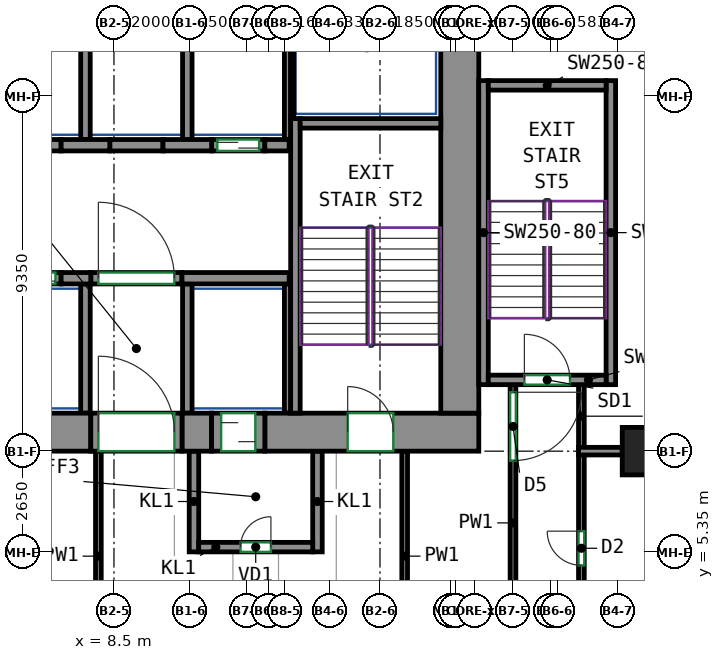
"""IFC4 building model, lengths in metres.
Left out: names, types, materials, properties, quantities, classifications, styles, units other than length and angle.
Written with IfcOpenShell. Run it as: python <this file> out.ifc"""

import sys

from ifc_helpers import new_model, si_unit, direction, frame, frame_2d, origin, origin_2d, place, context, subcontext, project, spatial, rectangle, extrude, source, transform, mapped, element, fill, save


model = new_model("IFC4")
c1 = context("Model", 3, precision=1e-05, world=origin(), true_north=direction((0.0, 1.0)))
c2 = subcontext(c1, "Body", "Model", "MODEL_VIEW")
j1 = project(units=[si_unit("LENGTHUNIT", "METRE"), si_unit("PLANEANGLEUNIT", "RADIAN")], contexts=[c1])
p1 = place(None, origin())
s1 = spatial("IfcSite", under=j1, at=p1, CompositionType="ELEMENT")
p2 = place(p1, origin())
s2 = spatial("IfcBuilding", under=s1, at=p2, CompositionType="ELEMENT")
p3 = place(p2, frame((0.0, 0.0, 91.2)))
s3 = spatial("IfcBuildingStorey", under=s2, at=p3, CompositionType="ELEMENT", Elevation=91.2)
m1 = source(origin(), c2, "Body", "SweptSolid", [
    extrude(rectangle(XDim=1.25, YDim=1.25, at=origin_2d()), origin(), (0.0, 0.0, 1.0), 3.6),
])
p4 = place(p3, frame((22.5, 8.0, 0.0), z_axis=(0.0, 0.0, 1.0), x_axis=(1.0, 0.0, 0.0)))
e1 = element("IfcColumn", 1, at=p4, inside=s3, PredefinedType="COLUMN", context=c2, shape_type="MappedRepresentation", body=[
    mapped(m1, transform((0.0, 0.0, 0.0))),
])
m2 = source(origin(), c2, "Body", "SweptSolid", [
    extrude(rectangle(XDim=14.18, YDim=1.0, at=frame_2d((7.09, 0.0))), origin(), (0.0, 0.0, 1.0), 3.6),
])
p5 = place(p3, frame((-6.29, 8.5, 0.0), z_axis=(0.0, 0.0, 1.0), x_axis=(1.0, 0.0, 0.0)))
e2 = element("IfcWall", 2, at=p5, inside=s3, PredefinedType="SHEAR", context=c2, shape_type="MappedRepresentation", body=[
    mapped(m2, transform((0.0, 0.0, 0.0))),
])
m3 = source(origin(), c2, "Body", "SweptSolid", [
    extrude(rectangle(XDim=0.78, YDim=1.0, at=frame_2d((0.39, 0.0))), origin(), (0.0, 0.0, 1.0), 3.6),
])
p6 = place(p3, frame((10.29, 8.5, 0.0), z_axis=(0.0, 0.0, 1.0), x_axis=(1.0, 0.0, 0.0)))
e3 = element("IfcWall", 3, at=p6, inside=s3, PredefinedType="SHEAR", context=c2, shape_type="MappedRepresentation", body=[
    mapped(m3, transform((0.0, 0.0, 0.0))),
])
m4 = source(origin(), c2, "Body", "SweptSolid", [
    extrude(rectangle(XDim=5.63, YDim=1.0, at=frame_2d((2.815, 0.0))), origin(), (0.0, 0.0, 1.0), 3.6),
])
p7 = place(p3, frame((12.47, 8.5, 0.0), z_axis=(0.0, 0.0, 1.0), x_axis=(1.0, 0.0, 0.0)))
e4 = element("IfcWall", 4, at=p7, inside=s3, PredefinedType="SHEAR", context=c2, shape_type="MappedRepresentation", body=[
    mapped(m4, transform((0.0, 0.0, 0.0))),
])
p8 = place(p7, frame((2.18, 0.0, 0.0)))
e5 = element("IfcOpeningElement", 5, at=p8, cuts=e4, PredefinedType="OPENING", context=c2, shape_type="SweptSolid", body=[
    extrude(rectangle(XDim=1.2, YDim=2.1, at=frame_2d((0.6, 1.05))), frame((0.0, 0.51, 0.0), z_axis=(0.0, -1.0, 0.0), x_axis=(1.0, 0.0, 0.0)), (0.0, 0.0, 1.0), 1.02),
])
m5 = source(origin(), c2, "Body", "SweptSolid", [
    extrude(rectangle(XDim=12.0, YDim=1.0, at=frame_2d((6.0, 0.0))), origin(), (0.0, 0.0, 1.0), 3.6),
])
p9 = place(p3, frame((17.6, 9.0, 0.0), z_axis=(0.0, 0.0, 1.0), x_axis=(0.0, 1.0, 0.0)))
e6 = element("IfcWall", 6, at=p9, inside=s3, PredefinedType="SHEAR", context=c2, shape_type="MappedRepresentation", body=[
    mapped(m5, transform((0.0, 0.0, 0.0))),
])
m6 = source(origin(), c2, "Body", "SweptSolid", [
    extrude(rectangle(XDim=7.75, YDim=0.25, at=frame_2d((3.875, 0.0))), origin(), (0.0, 0.0, 1.0), 3.6),
])
p10 = place(p3, frame((13.275, 9.0, 0.0), z_axis=(0.0, 0.0, 1.0), x_axis=(0.0, 1.0, 0.0)))
e7 = element("IfcWall", 7, at=p10, inside=s3, PredefinedType="SHEAR", context=c2, shape_type="MappedRepresentation", body=[
    mapped(m6, transform((0.0, 0.0, 0.0))),
])
m7 = source(origin(), c2, "Body", "SweptSolid", [
    extrude(rectangle(XDim=3.7, YDim=0.25, at=frame_2d((1.85, 0.0))), origin(), (0.0, 0.0, 1.0), 3.6),
])
p11 = place(p3, frame((13.4, 16.625, 0.0), z_axis=(0.0, 0.0, 1.0), x_axis=(1.0, 0.0, 0.0)))
e8 = element("IfcWall", 8, at=p11, inside=s3, PredefinedType="SHEAR", context=c2, shape_type="MappedRepresentation", body=[
    mapped(m7, transform((0.0, 0.0, 0.0))),
])
m8 = source(origin(), c2, "Body", "SweptSolid", [
    extrude(rectangle(XDim=8.0, YDim=0.25, at=frame_2d((4.0, 0.0))), origin(), (0.0, 0.0, 1.0), 3.6),
])
for number, where, z_axis, x_axis in (
    (9, (18.225, 9.75, 0.0), (0.0, 0.0, 1.0), (0.0, 1.0, 0.0)),
    (10, (21.575, 9.75, 0.0), (0.0, 0.0, 1.0), (0.0, 1.0, 0.0)),
):
    element("IfcWall", number, at=place(p3, frame(where, z_axis=z_axis, x_axis=x_axis)), inside=s3, PredefinedType="SHEAR", context=c2, shape_type="MappedRepresentation", body=[
        mapped(m8, transform((0.0, 0.0, 0.0))),
    ])
m9 = source(origin(), c2, "Body", "SweptSolid", [
    extrude(rectangle(XDim=3.1, YDim=0.25, at=frame_2d((1.55, 0.0))), origin(), (0.0, 0.0, 1.0), 3.6),
])
p12 = place(p3, frame((18.35, 9.875, 0.0), z_axis=(0.0, 0.0, 1.0), x_axis=(1.0, 0.0, 0.0)))
e11 = element("IfcWall", 11, at=p12, inside=s3, PredefinedType="SHEAR", context=c2, shape_type="MappedRepresentation", body=[
    mapped(m9, transform((0.0, 0.0, 0.0))),
])
p13 = place(p12, frame((0.95, 0.0, 0.0)))
e12 = element("IfcOpeningElement", 12, at=p13, cuts=e11, PredefinedType="OPENING", context=c2, shape_type="SweptSolid", body=[
    extrude(rectangle(XDim=1.2, YDim=2.1, at=frame_2d((0.6, 1.05))), frame((0.0, 0.135, 0.0), z_axis=(0.0, -1.0, 0.0), x_axis=(1.0, 0.0, 0.0)), (0.0, 0.0, 1.0), 0.27),
])
p14 = place(p3, frame((18.35, 17.625, 0.0), z_axis=(0.0, 0.0, 1.0), x_axis=(1.0, 0.0, 0.0)))
e13 = element("IfcWall", 13, at=p14, inside=s3, PredefinedType="SHEAR", context=c2, shape_type="MappedRepresentation", body=[
    mapped(m9, transform((0.0, 0.0, 0.0))),
])
m10 = source(origin(), c2, "Body", "SweptSolid", [
    extrude(rectangle(XDim=0.78, YDim=0.3, at=frame_2d((0.39, 0.0))), origin(), (0.0, 0.0, 1.0), 3.6),
])
p15 = place(p3, frame((7.11, 12.55, 0.0), z_axis=(0.0, 0.0, 1.0), x_axis=(1.0, 0.0, 0.0)))
e14 = element("IfcWall", 14, at=p15, inside=s3, PredefinedType="SHEAR", context=c2, shape_type="MappedRepresentation", body=[
    mapped(m10, transform((0.0, 0.0, 0.0))),
])
m11 = source(origin(), c2, "Body", "SweptSolid", [
    extrude(rectangle(XDim=2.82, YDim=0.3, at=frame_2d((1.41, 0.0))), origin(), (0.0, 0.0, 1.0), 3.6),
])
p16 = place(p3, frame((10.29, 12.55, 0.0), z_axis=(0.0, 0.0, 1.0), x_axis=(1.0, 0.0, 0.0)))
e15 = element("IfcWall", 15, at=p16, inside=s3, PredefinedType="SHEAR", context=c2, shape_type="MappedRepresentation", body=[
    mapped(m11, transform((0.0, 0.0, 0.0))),
])
m12 = source(origin(), c2, "Body", "SweptSolid", [
    extrude(rectangle(XDim=1.28, YDim=0.3, at=frame_2d((0.64, 0.0))), origin(), (0.0, 0.0, 1.0), 3.6),
])
p17 = place(p3, frame((7.11, 16.05, 0.0), z_axis=(0.0, 0.0, 1.0), x_axis=(1.0, 0.0, 0.0)))
e16 = element("IfcWall", 16, at=p17, inside=s3, PredefinedType="SHEAR", context=c2, shape_type="MappedRepresentation", body=[
    mapped(m12, transform((0.0, 0.0, 0.0))),
])
m13 = source(origin(), c2, "Body", "SweptSolid", [
    extrude(rectangle(XDim=1.28, YDim=0.3, at=frame_2d((0.64, 0.0))), origin(), (0.0, 0.0, 1.0), 3.6),
])
p18 = place(p3, frame((9.79, 16.05, 0.0), z_axis=(0.0, 0.0, 1.0), x_axis=(1.0, 0.0, 0.0)))
e17 = element("IfcWall", 17, at=p18, inside=s3, PredefinedType="SHEAR", context=c2, shape_type="MappedRepresentation", body=[
    mapped(m13, transform((0.0, 0.0, 0.0))),
])
m14 = source(origin(), c2, "Body", "SweptSolid", [
    extrude(rectangle(XDim=0.64, YDim=0.3, at=frame_2d((0.32, 0.0))), origin(), (0.0, 0.0, 1.0), 3.6),
])
p19 = place(p3, frame((12.47, 16.05, 0.0), z_axis=(0.0, 0.0, 1.0), x_axis=(1.0, 0.0, 0.0)))
e18 = element("IfcWall", 18, at=p19, inside=s3, PredefinedType="SHEAR", context=c2, shape_type="MappedRepresentation", body=[
    mapped(m14, transform((0.0, 0.0, 0.0))),
])
m15 = source(origin(), c2, "Body", "SweptSolid", [
    extrude(rectangle(XDim=1.4, YDim=0.3, at=frame_2d((0.7, 0.0))), origin(), (0.0, 0.0, 1.0), 3.6),
])
p20 = place(p3, frame((5.71, 12.55, 0.0), z_axis=(0.0, 0.0, 1.0), x_axis=(1.0, 0.0, 0.0)))
e19 = element("IfcWall", 19, at=p20, inside=s3, PredefinedType="PARTITIONING", context=c2, shape_type="MappedRepresentation", body=[
    mapped(m15, transform((0.0, 0.0, 0.0))),
])
p21 = place(p20, frame((0.15, 0.0, 0.0)))
e20 = element("IfcOpeningElement", 20, at=p21, cuts=e19, PredefinedType="OPENING", context=c2, shape_type="SweptSolid", body=[
    extrude(rectangle(XDim=1.1, YDim=2.1, at=frame_2d((0.55, 1.05))), frame((0.0, 0.16, 0.0), z_axis=(0.0, -1.0, 0.0), x_axis=(1.0, 0.0, 0.0)), (0.0, 0.0, 1.0), 0.32),
])
m16 = source(origin(), c2, "Body", "SweptSolid", [
    extrude(rectangle(XDim=1.4, YDim=0.3, at=frame_2d((0.7, 0.0))), origin(), (0.0, 0.0, 1.0), 3.6),
])
p22 = place(p3, frame((11.07, 16.05, 0.0), z_axis=(0.0, 0.0, 1.0), x_axis=(1.0, 0.0, 0.0)))
e21 = element("IfcWall", 21, at=p22, inside=s3, PredefinedType="PARTITIONING", context=c2, shape_type="MappedRepresentation", body=[
    mapped(m16, transform((0.0, 0.0, 0.0))),
])
p23 = place(p22, frame((0.15, 0.0, 0.0)))
e22 = element("IfcOpeningElement", 22, at=p23, cuts=e21, PredefinedType="OPENING", context=c2, shape_type="SweptSolid", body=[
    extrude(rectangle(XDim=1.1, YDim=2.1, at=frame_2d((0.55, 1.05))), frame((0.0, 0.16, 0.0), z_axis=(0.0, -1.0, 0.0), x_axis=(1.0, 0.0, 0.0)), (0.0, 0.0, 1.0), 0.32),
])
m17 = source(origin(), c2, "Body", "SweptSolid", [
    extrude(rectangle(XDim=2.4, YDim=0.3, at=frame_2d((1.2, 0.0))), origin(), (0.0, 0.0, 1.0), 3.6),
])
p24 = place(p3, frame((7.89, 12.55, 0.0), z_axis=(0.0, 0.0, 1.0), x_axis=(1.0, 0.0, 0.0)))
e23 = element("IfcWall", 23, at=p24, inside=s3, PredefinedType="PARTITIONING", context=c2, shape_type="MappedRepresentation", body=[
    mapped(m17, transform((0.0, 0.0, 0.0))),
])
p25 = place(p24, frame((0.2, 0.0, 0.0)))
e24 = element("IfcOpeningElement", 24, at=p25, cuts=e23, PredefinedType="OPENING", context=c2, shape_type="SweptSolid", body=[
    extrude(rectangle(XDim=2.0, YDim=2.1, at=frame_2d((1.0, 1.05))), frame((0.0, 0.16, 0.0), z_axis=(0.0, -1.0, 0.0), x_axis=(1.0, 0.0, 0.0)), (0.0, 0.0, 1.0), 0.32),
])
for number, where, z_axis, x_axis in (
    (25, (5.71, 16.05, 0.0), (0.0, 0.0, 1.0), (1.0, 0.0, 0.0)),
    (26, (8.39, 16.05, 0.0), (0.0, 0.0, 1.0), (1.0, 0.0, 0.0)),
):
    element("IfcWall", number, at=place(p3, frame(where, z_axis=z_axis, x_axis=x_axis)), inside=s3, PredefinedType="PARTITIONING", context=c2, shape_type="MappedRepresentation", body=[
        mapped(m15, transform((0.0, 0.0, 0.0))),
    ])
m18 = source(origin(), c2, "Body", "SweptSolid", [
    extrude(rectangle(XDim=2.65, YDim=0.25, at=frame_2d((1.325, 0.0))), origin(), (0.0, 0.0, 1.0), 3.6),
])
for number, where, z_axis, x_axis in (
    (27, (10.605, 5.35, 0.0), (0.0, 0.0, 1.0), (0.0, 1.0, 0.0)),
    (28, (13.855, 5.35, 0.0), (0.0, 0.0, 1.0), (0.0, 1.0, 0.0)),
):
    element("IfcWall", number, at=place(p3, frame(where, z_axis=z_axis, x_axis=x_axis)), inside=s3, PredefinedType="PARTITIONING", context=c2, shape_type="MappedRepresentation", body=[
        mapped(m18, transform((0.0, 0.0, 0.0))),
    ])
m19 = source(origin(), c2, "Body", "SweptSolid", [
    extrude(rectangle(XDim=3.0, YDim=0.25, at=frame_2d((1.5, 0.0))), origin(), (0.0, 0.0, 1.0), 3.6),
])
p26 = place(p3, frame((10.73, 5.475, 0.0), z_axis=(0.0, 0.0, 1.0), x_axis=(1.0, 0.0, 0.0)))
e29 = element("IfcWall", 29, at=p26, inside=s3, PredefinedType="PARTITIONING", context=c2, shape_type="MappedRepresentation", body=[
    mapped(m19, transform((0.0, 0.0, 0.0))),
])
p27 = place(p26, frame((1.1, 0.0, 0.0)))
e30 = element("IfcOpeningElement", 30, at=p27, cuts=e29, PredefinedType="OPENING", context=c2, shape_type="SweptSolid", body=[
    extrude(rectangle(XDim=0.8, YDim=2.0, at=frame_2d((0.4, 1.0))), frame((0.0, 0.135, 0.0), z_axis=(0.0, -1.0, 0.0), x_axis=(1.0, 0.0, 0.0)), (0.0, 0.0, 1.0), 0.27),
])
m20 = source(origin(), c2, "Body", "SweptSolid", [
    extrude(rectangle(XDim=3.275, YDim=0.165, at=frame_2d((1.638, 0.0))), origin(), (0.0, 0.0, 1.0), 3.6),
])
p28 = place(p3, frame((13.067, 16.2, 0.0), z_axis=(0.0, 0.0, 1.0), x_axis=(0.0, 1.0, 0.0)))
e31 = element("IfcWall", 31, at=p28, inside=s3, PredefinedType="PARTITIONING", context=c2, shape_type="MappedRepresentation", body=[
    mapped(m20, transform((0.0, 0.0, 0.0))),
])
m21 = source(origin(), c2, "Body", "SweptSolid", [
    extrude(rectangle(XDim=3.275, YDim=0.25, at=frame_2d((1.638, 0.0))), origin(), (0.0, 0.0, 1.0), 3.6),
])
p29 = place(p3, frame((10.43, 16.2, 0.0), z_axis=(0.0, 0.0, 1.0), x_axis=(0.0, 1.0, 0.0)))
e32 = element("IfcWall", 32, at=p29, inside=s3, PredefinedType="PARTITIONING", context=c2, shape_type="MappedRepresentation", body=[
    mapped(m21, transform((0.0, 0.0, 0.0))),
])
m22 = source(origin(), c2, "Body", "SweptSolid", [
    extrude(rectangle(XDim=2.725, YDim=0.085, at=frame_2d((1.363, 0.0))), origin(), (0.0, 0.0, 1.0), 3.6),
])
p30 = place(p3, frame((13.192, 16.75, 0.0), z_axis=(0.0, 0.0, 1.0), x_axis=(0.0, 1.0, 0.0)))
e33 = element("IfcWall", 33, at=p30, inside=s3, PredefinedType="PARTITIONING", context=c2, shape_type="MappedRepresentation", body=[
    mapped(m22, transform((0.0, 0.0, 0.0))),
])
p31 = place(p3, frame((7.75, 16.2, 0.0), z_axis=(0.0, 0.0, 1.0), x_axis=(0.0, 1.0, 0.0)))
e34 = element("IfcWall", 34, at=p31, inside=s3, PredefinedType="PARTITIONING", context=c2, shape_type="MappedRepresentation", body=[
    mapped(m21, transform((0.0, 0.0, 0.0))),
])
m23 = source(origin(), c2, "Body", "SweptSolid", [
    extrude(rectangle(XDim=3.4, YDim=0.25, at=frame_2d((1.7, 0.0))), origin(), (0.0, 0.0, 1.0), 3.6),
])
p32 = place(p3, frame((10.43, 9.0, 0.0), z_axis=(0.0, 0.0, 1.0), x_axis=(0.0, 1.0, 0.0)))
e35 = element("IfcWall", 35, at=p32, inside=s3, PredefinedType="PARTITIONING", context=c2, shape_type="MappedRepresentation", body=[
    mapped(m23, transform((0.0, 0.0, 0.0))),
])
m24 = source(origin(), c2, "Body", "SweptSolid", [
    extrude(rectangle(XDim=3.4, YDim=0.165, at=frame_2d((1.7, 0.0))), origin(), (0.0, 0.0, 1.0), 3.6),
])
p33 = place(p3, frame((13.067, 9.0, 0.0), z_axis=(0.0, 0.0, 1.0), x_axis=(0.0, 1.0, 0.0)))
e36 = element("IfcWall", 36, at=p33, inside=s3, PredefinedType="PARTITIONING", context=c2, shape_type="MappedRepresentation", body=[
    mapped(m24, transform((0.0, 0.0, 0.0))),
])
p34 = place(p3, frame((7.75, 9.0, 0.0), z_axis=(0.0, 0.0, 1.0), x_axis=(0.0, 1.0, 0.0)))
e37 = element("IfcWall", 37, at=p34, inside=s3, PredefinedType="PARTITIONING", context=c2, shape_type="MappedRepresentation", body=[
    mapped(m23, transform((0.0, 0.0, 0.0))),
])
m25 = source(origin(), c2, "Body", "SweptSolid", [
    extrude(rectangle(XDim=2.4, YDim=1.0, at=frame_2d((1.2, 0.0))), origin(), (0.0, 0.0, 1.0), 2.7),
])
p35 = place(p3, frame((7.89, 8.5, 0.0), z_axis=(0.0, 0.0, 1.0), x_axis=(1.0, 0.0, 0.0)))
e38 = element("IfcWall", 38, at=p35, inside=s3, PredefinedType="PARTITIONING", context=c2, shape_type="MappedRepresentation", body=[
    mapped(m25, transform((0.0, 0.0, 0.0))),
])
p36 = place(p35, frame((0.2, 0.0, 0.0)))
e39 = element("IfcOpeningElement", 39, at=p36, cuts=e38, PredefinedType="OPENING", context=c2, shape_type="SweptSolid", body=[
    extrude(rectangle(XDim=2.0, YDim=2.1, at=frame_2d((1.0, 1.05))), frame((0.0, 0.51, 0.0), z_axis=(0.0, -1.0, 0.0), x_axis=(1.0, 0.0, 0.0)), (0.0, 0.0, 1.0), 1.02),
])
m26 = source(origin(), c2, "Body", "SweptSolid", [
    extrude(rectangle(XDim=1.4, YDim=1.0, at=frame_2d((0.7, 0.0))), origin(), (0.0, 0.0, 1.0), 2.7),
])
p37 = place(p3, frame((11.07, 8.5, 0.0), z_axis=(0.0, 0.0, 1.0), x_axis=(1.0, 0.0, 0.0)))
e40 = element("IfcWall", 40, at=p37, inside=s3, PredefinedType="PARTITIONING", context=c2, shape_type="MappedRepresentation", body=[
    mapped(m26, transform((0.0, 0.0, 0.0))),
])
p38 = place(p37, frame((0.25, 0.0, 0.0)))
e41 = element("IfcOpeningElement", 41, at=p38, cuts=e40, PredefinedType="OPENING", context=c2, shape_type="SweptSolid", body=[
    extrude(rectangle(XDim=0.9, YDim=2.1, at=frame_2d((0.45, 1.05))), frame((0.0, 0.51, 0.0), z_axis=(0.0, -1.0, 0.0), x_axis=(1.0, 0.0, 0.0)), (0.0, 0.0, 1.0), 1.02),
])
for number, where, z_axis, x_axis in (
    (42, (8.09, 8.0, 0.0), (0.0, 0.0, 1.0), (0.0, -1.0, 0.0)),
    (43, (16.15, 2.475, 0.0), (0.0, 0.0, 1.0), (0.0, 1.0, 0.0)),
):
    element("IfcWall", number, at=place(p3, frame(where, z_axis=z_axis, x_axis=x_axis)), inside=s3, PredefinedType="PARTITIONING", context=c2, shape_type="SweptSolid", body=[
        extrude(rectangle(XDim=5.525, YDim=0.15, at=frame_2d((2.762, 0.0))), origin(), (0.0, 0.0, 1.0), 3.6),
    ])
p39 = place(p3, frame((19.0, 9.75, 0.0), z_axis=(0.0, 0.0, 1.0), x_axis=(0.0, -1.0, 0.0)))
e44 = element("IfcWall", 44, at=p39, inside=s3, PredefinedType="PARTITIONING", context=c2, shape_type="SweptSolid", body=[
    extrude(rectangle(XDim=7.275, YDim=0.15, at=frame_2d((3.637, 0.0))), origin(), (0.0, 0.0, 1.0), 3.6),
])
p40 = place(p39, frame((0.2, 0.0, 0.0)))
e45 = element("IfcOpeningElement", 45, at=p40, cuts=e44, PredefinedType="OPENING", context=c2, shape_type="SweptSolid", body=[
    extrude(rectangle(XDim=1.8, YDim=2.1, at=frame_2d((0.9, 1.05))), frame((0.0, 0.085, 0.0), z_axis=(0.0, -1.0, 0.0), x_axis=(1.0, 0.0, 0.0)), (0.0, 0.0, 1.0), 0.17),
])
p41 = place(p3, frame((20.8, 8.09, 0.0), z_axis=(0.0, 0.0, 1.0), x_axis=(0.0, 1.0, 0.0)))
e46 = element("IfcWall", 46, at=p41, inside=s3, PredefinedType="PARTITIONING", context=c2, shape_type="SweptSolid", body=[
    extrude(rectangle(XDim=1.66, YDim=0.15, at=frame_2d((0.83, 0.0))), origin(), (0.0, 0.0, 1.0), 3.6),
])
p42 = place(p3, frame((20.8, 2.475, 0.0), z_axis=(0.0, 0.0, 1.0), x_axis=(0.0, 1.0, 0.0)))
e47 = element("IfcWall", 47, at=p42, inside=s3, PredefinedType="PARTITIONING", context=c2, shape_type="SweptSolid", body=[
    extrude(rectangle(XDim=5.435, YDim=0.15, at=frame_2d((2.717, 0.0))), origin(), (0.0, 0.0, 1.0), 3.6),
])
p43 = place(p42, frame((2.52, 0.0, 0.0)))
e48 = element("IfcOpeningElement", 48, at=p43, cuts=e47, PredefinedType="OPENING", context=c2, shape_type="SweptSolid", body=[
    extrude(rectangle(XDim=0.9, YDim=2.1, at=frame_2d((0.45, 1.05))), frame((0.0, 0.085, 0.0), z_axis=(0.0, -1.0, 0.0), x_axis=(1.0, 0.0, 0.0)), (0.0, 0.0, 1.0), 0.17),
])
p44 = place(p3, frame((20.726, 8.0, 0.0), z_axis=(0.0, 0.0, 1.0), x_axis=(1.0, 0.0, 0.0)))
e49 = element("IfcWall", 49, at=p44, inside=s3, PredefinedType="PARTITIONING", context=c2, shape_type="SweptSolid", body=[
    extrude(rectangle(XDim=1.149, YDim=0.2, at=frame_2d((0.574, 0.0))), origin(), (0.0, 0.0, 1.0), 3.6),
])
p45 = place(p25, origin())
e50 = element("IfcDoor", 50, at=p45, inside=s3, OperationType="DOUBLE_DOOR_SINGLE_SWING", PredefinedType="DOOR", context=c2, shape_type="SweptSolid", body=[
    extrude(rectangle(XDim=2.0, YDim=2.1, at=frame_2d((1.0, 1.05))), frame((0.0, 0.025, 0.0), z_axis=(0.0, -1.0, 0.0), x_axis=(1.0, 0.0, 0.0)), (0.0, 0.0, 1.0), 0.05),
])
fill(e24, e50)
p46 = place(p36, origin())
e51 = element("IfcDoor", 51, at=p46, inside=s3, OperationType="DOUBLE_DOOR_SINGLE_SWING", PredefinedType="DOOR", context=c2, shape_type="SweptSolid", body=[
    extrude(rectangle(XDim=2.0, YDim=2.1, at=frame_2d((1.0, 1.05))), frame((0.0, 0.405, 0.0), z_axis=(0.0, -1.0, 0.0), x_axis=(1.0, 0.0, 0.0)), (0.0, 0.0, 1.0), 0.05),
])
fill(e39, e51)
p47 = place(p27, origin())
e52 = element("IfcDoor", 52, at=p47, inside=s3, OperationType="SINGLE_SWING_RIGHT", PredefinedType="DOOR", context=c2, shape_type="SweptSolid", body=[
    extrude(rectangle(XDim=0.8, YDim=2.0, at=frame_2d((0.4, 1.0))), frame((0.0, 0.025, 0.0), z_axis=(0.0, -1.0, 0.0), x_axis=(1.0, 0.0, 0.0)), (0.0, 0.0, 1.0), 0.05),
])
fill(e30, e52)
p48 = place(p38, origin())
e53 = element("IfcDoor", 53, at=p48, inside=s3, OperationType="SLIDING_TO_LEFT", PredefinedType="DOOR", context=c2, shape_type="SweptSolid", body=[
    extrude(rectangle(XDim=0.9, YDim=2.1, at=frame_2d((0.45, 1.05))), frame((0.0, 0.405, 0.0), z_axis=(0.0, -1.0, 0.0), x_axis=(1.0, 0.0, 0.0)), (0.0, 0.0, 1.0), 0.05),
])
fill(e41, e53)
p49 = place(p21, origin())
e54 = element("IfcDoor", 54, at=p49, inside=s3, OperationType="DOUBLE_DOOR_SLIDING", PredefinedType="DOOR", context=c2, shape_type="SweptSolid", body=[
    extrude(rectangle(XDim=1.1, YDim=2.1, at=frame_2d((0.55, 1.05))), frame((0.0, 0.025, 0.0), z_axis=(0.0, -1.0, 0.0), x_axis=(1.0, 0.0, 0.0)), (0.0, 0.0, 1.0), 0.05),
])
fill(e20, e54)
p50 = place(p23, origin())
e55 = element("IfcDoor", 55, at=p50, inside=s3, OperationType="DOUBLE_DOOR_SLIDING", PredefinedType="DOOR", context=c2, shape_type="SweptSolid", body=[
    extrude(rectangle(XDim=1.1, YDim=2.1, at=frame_2d((0.55, 1.05))), frame((0.0, 0.025, 0.0), z_axis=(0.0, -1.0, 0.0), x_axis=(1.0, 0.0, 0.0)), (0.0, 0.0, 1.0), 0.05),
])
fill(e22, e55)
p51 = place(p8, origin())
e56 = element("IfcDoor", 56, at=p51, inside=s3, OperationType="DOUBLE_DOOR_SINGLE_SWING", PredefinedType="DOOR", context=c2, shape_type="SweptSolid", body=[
    extrude(rectangle(XDim=1.2, YDim=2.1, at=frame_2d((0.6, 1.05))), frame((0.0, 0.405, 0.0), z_axis=(0.0, -1.0, 0.0), x_axis=(1.0, 0.0, 0.0)), (0.0, 0.0, 1.0), 0.05),
])
fill(e5, e56)
p52 = place(p13, origin())
e57 = element("IfcDoor", 57, at=p52, inside=s3, OperationType="DOUBLE_DOOR_SINGLE_SWING", PredefinedType="DOOR", context=c2, shape_type="SweptSolid", body=[
    extrude(rectangle(XDim=1.2, YDim=2.1, at=frame_2d((0.6, 1.05))), frame((0.0, 0.025, 0.0), z_axis=(0.0, -1.0, 0.0), x_axis=(1.0, 0.0, 0.0)), (0.0, 0.0, 1.0), 0.05),
])
fill(e12, e57)
p53 = place(p43, origin())
e58 = element("IfcDoor", 58, at=p53, inside=s3, OperationType="SINGLE_SWING_RIGHT", PredefinedType="DOOR", context=c2, shape_type="SweptSolid", body=[
    extrude(rectangle(XDim=0.9, YDim=2.1, at=frame_2d((0.45, 1.05))), frame((0.0, 0.025, 0.0), z_axis=(0.0, -1.0, 0.0), x_axis=(1.0, 0.0, 0.0)), (0.0, 0.0, 1.0), 0.05),
])
fill(e48, e58)
p54 = place(p40, origin())
e59 = element("IfcDoor", 59, at=p54, inside=s3, OperationType="DOUBLE_DOOR_SINGLE_SWING", PredefinedType="DOOR", context=c2, shape_type="SweptSolid", body=[
    extrude(rectangle(XDim=1.8, YDim=2.1, at=frame_2d((0.9, 1.05))), frame((0.0, 0.025, 0.0), z_axis=(0.0, -1.0, 0.0), x_axis=(1.0, 0.0, 0.0)), (0.0, 0.0, 1.0), 0.05),
])
fill(e45, e59)
save(model, sys.argv[1])
